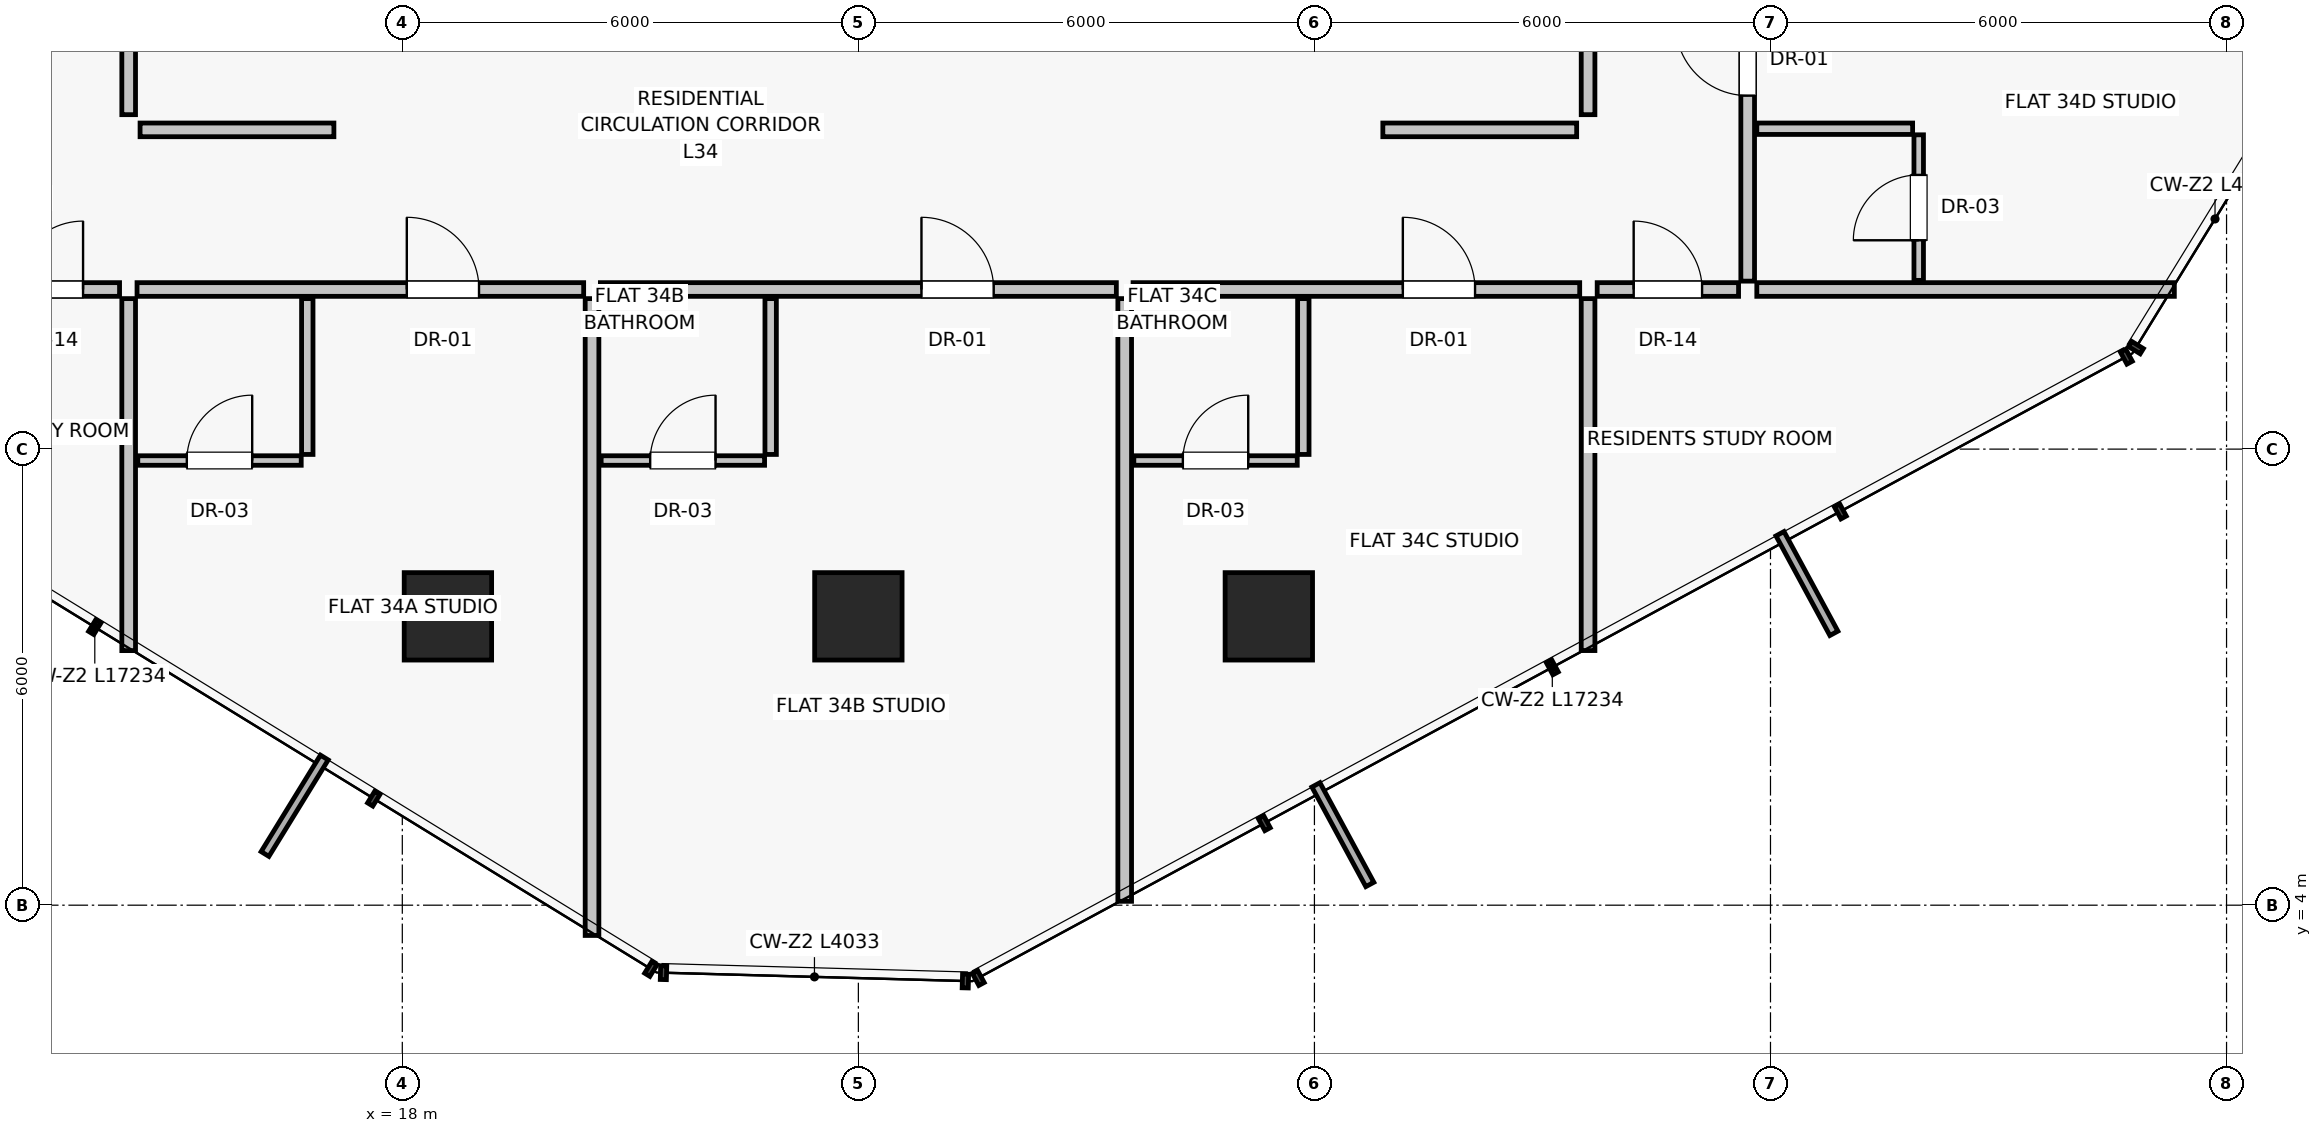
"""IFC4 building model, lengths in metres.
Left out: names, types, materials, properties, quantities, classifications, styles, units other than length and angle.
Written with IfcOpenShell. Run it as: python <this file> out.ifc"""

import sys

from ifc_helpers import new_model, si_unit, direction, frame, frame_2d, origin, origin_2d, place, context, subcontext, project, spatial, rectangle, extrude, source, transform, mapped, element, fill, save


model = new_model("IFC4")
c1 = context("Model", 3, precision=1e-05, world=origin(), true_north=direction((0.0, 1.0)))
c2 = subcontext(c1, "Body", "Model", "MODEL_VIEW")
j1 = project(units=[si_unit("LENGTHUNIT", "METRE"), si_unit("PLANEANGLEUNIT", "RADIAN")], contexts=[c1])
p1 = place(None, origin())
s1 = spatial("IfcSite", under=j1, at=p1, CompositionType="ELEMENT")
p2 = place(p1, origin())
s2 = spatial("IfcBuilding", under=s1, at=p2, CompositionType="ELEMENT")
p3 = place(p2, frame((0.0, 0.0, 123.0)))
s3 = spatial("IfcBuildingStorey", under=s2, at=p3, CompositionType="ELEMENT", Elevation=123.0)
for number, where, z_axis, x_axis in (
    (1, (18.6, 7.8, 0.0), (0.0, 0.0, 1.0), (1.0, 0.0, 0.0)),
    (2, (24.0, 7.8, 0.0), (0.0, 0.0, 1.0), (1.0, 0.0, 0.0)),
    (3, (29.4, 7.8, 0.0), (0.0, 0.0, 1.0), (1.0, 0.0, 0.0)),
):
    element("IfcColumn", number, at=place(p3, frame(where, z_axis=z_axis, x_axis=x_axis)), inside=s3, PredefinedType="COLUMN", context=c2, shape_type="SweptSolid", body=[
        extrude(rectangle(XDim=1.15, YDim=1.15, at=origin_2d()), origin(), (0.0, 0.0, 1.0), 3.25),
    ])
p4 = place(p3, frame((14.4, 14.4, 0.0), z_axis=(0.0, 0.0, 1.0), x_axis=(0.0, 1.0, 0.0)))
e4 = element("IfcWall", 4, at=p4, inside=s3, PredefinedType="PARTITIONING", context=c2, shape_type="SweptSolid", body=[
    extrude(rectangle(XDim=9.4, YDim=0.18, at=frame_2d((4.7, 0.0))), origin(), (0.0, 0.0, 1.0), 3.0),
])
p5 = place(p4, frame((3.8, 0.0, 0.0)))
e5 = element("IfcOpeningElement", 5, at=p5, cuts=e4, PredefinedType="OPENING", context=c2, shape_type="SweptSolid", body=[
    extrude(rectangle(XDim=0.9, YDim=2.01, at=frame_2d((0.45, 1.005))), frame((0.0, 0.1, 0.0), z_axis=(0.0, -1.0, 0.0), x_axis=(1.0, 0.0, 0.0)), (0.0, 0.0, 1.0), 0.2),
])
p6 = place(p3, frame((33.6, 14.4, 0.0), z_axis=(0.0, 0.0, 1.0), x_axis=(0.0, 1.0, 0.0)))
e6 = element("IfcWall", 6, at=p6, inside=s3, PredefinedType="PARTITIONING", context=c2, shape_type="SweptSolid", body=[
    extrude(rectangle(XDim=9.4, YDim=0.18, at=frame_2d((4.7, 0.0))), origin(), (0.0, 0.0, 1.0), 3.0),
])
p7 = place(p6, frame((3.8, 0.0, 0.0)))
e7 = element("IfcOpeningElement", 7, at=p7, cuts=e6, PredefinedType="OPENING", context=c2, shape_type="SweptSolid", body=[
    extrude(rectangle(XDim=0.9, YDim=2.01, at=frame_2d((0.45, 1.005))), frame((0.0, 0.1, 0.0), z_axis=(0.0, -1.0, 0.0), x_axis=(1.0, 0.0, 0.0)), (0.0, 0.0, 1.0), 0.2),
])
for number, where, z_axis, x_axis in (
    (8, (14.55, 14.2, 0.0), (0.0, 0.0, 1.0), (1.0, 0.0, 0.0)),
    (9, (30.9, 14.2, 0.0), (0.0, 0.0, 1.0), (1.0, 0.0, 0.0)),
):
    element("IfcWall", number, at=place(p3, frame(where, z_axis=z_axis, x_axis=x_axis)), inside=s3, PredefinedType="PARTITIONING", context=c2, shape_type="SweptSolid", body=[
        extrude(rectangle(XDim=2.55, YDim=0.18, at=frame_2d((1.275, 0.0))), origin(), (0.0, 0.0, 1.0), 3.0),
    ])
p8 = place(p3, frame((14.4, 11.98, 0.0), z_axis=(0.0, 0.0, 1.0), x_axis=(0.0, -1.0, 0.0)))
e10 = element("IfcWall", 10, at=p8, inside=s3, PredefinedType="PARTITIONING", context=c2, shape_type="SweptSolid", body=[
    extrude(rectangle(XDim=4.631, YDim=0.18, at=frame_2d((2.315, 0.0))), origin(), (0.0, 0.0, 1.0), 3.0),
])
p9 = place(p3, frame((33.6, 11.98, 0.0), z_axis=(0.0, 0.0, 1.0), x_axis=(0.0, -1.0, 0.0)))
e11 = element("IfcWall", 11, at=p9, inside=s3, PredefinedType="PARTITIONING", context=c2, shape_type="SweptSolid", body=[
    extrude(rectangle(XDim=4.63, YDim=0.18, at=frame_2d((2.315, 0.0))), origin(), (0.0, 0.0, 1.0), 3.0),
])
p10 = place(p3, frame((14.51, 12.1, 0.0), z_axis=(0.0, 0.0, 1.0), x_axis=(1.0, 0.0, 0.0)))
e12 = element("IfcWall", 12, at=p10, inside=s3, PredefinedType="PARTITIONING", context=c2, shape_type="SweptSolid", body=[
    extrude(rectangle(XDim=5.876, YDim=0.18, at=frame_2d((2.938, 0.0))), origin(), (0.0, 0.0, 1.0), 2.58),
])
p11 = place(p10, frame((3.549, 0.0, 0.0)))
e13 = element("IfcOpeningElement", 13, at=p11, cuts=e12, PredefinedType="OPENING", context=c2, shape_type="SweptSolid", body=[
    extrude(rectangle(XDim=0.95, YDim=2.02, at=frame_2d((0.475, 1.01))), frame((0.0, 0.1, 0.0), z_axis=(0.0, -1.0, 0.0), x_axis=(1.0, 0.0, 0.0)), (0.0, 0.0, 1.0), 0.2),
])
p12 = place(p3, frame((16.75, 11.98, 0.0), z_axis=(0.0, 0.0, 1.0), x_axis=(0.0, -1.0, 0.0)))
e14 = element("IfcWall", 14, at=p12, inside=s3, PredefinedType="PARTITIONING", context=c2, shape_type="SweptSolid", body=[
    extrude(rectangle(XDim=2.05, YDim=0.15, at=frame_2d((1.025, 0.0))), origin(), (0.0, 0.0, 1.0), 3.0),
])
p13 = place(p3, frame((14.52, 9.85, 0.0), z_axis=(0.0, 0.0, 1.0), x_axis=(1.0, 0.0, 0.0)))
e15 = element("IfcWall", 15, at=p13, inside=s3, PredefinedType="PARTITIONING", context=c2, shape_type="SweptSolid", body=[
    extrude(rectangle(XDim=2.15, YDim=0.125, at=frame_2d((1.075, 0.0))), origin(), (0.0, 0.0, 1.0), 3.0),
])
p14 = place(p13, frame((0.645, 0.0, 0.0)))
e16 = element("IfcOpeningElement", 16, at=p14, cuts=e15, PredefinedType="OPENING", context=c2, shape_type="SweptSolid", body=[
    extrude(rectangle(XDim=0.86, YDim=2.01, at=frame_2d((0.43, 1.005))), frame((0.0, 0.073, 0.0), z_axis=(0.0, -1.0, 0.0), x_axis=(1.0, 0.0, 0.0)), (0.0, 0.0, 1.0), 0.145),
])
p15 = place(p3, frame((20.496, 11.98, 0.0), z_axis=(0.0, 0.0, 1.0), x_axis=(0.0, -1.0, 0.0)))
e17 = element("IfcWall", 17, at=p15, inside=s3, PredefinedType="PARTITIONING", context=c2, shape_type="SweptSolid", body=[
    extrude(rectangle(XDim=8.378, YDim=0.18, at=frame_2d((4.189, 0.0))), origin(), (0.0, 0.0, 1.0), 3.0),
])
p16 = place(p3, frame((20.606, 12.1, 0.0), z_axis=(0.0, 0.0, 1.0), x_axis=(1.0, 0.0, 0.0)))
e18 = element("IfcWall", 18, at=p16, inside=s3, PredefinedType="PARTITIONING", context=c2, shape_type="SweptSolid", body=[
    extrude(rectangle(XDim=6.788, YDim=0.18, at=frame_2d((3.394, 0.0))), origin(), (0.0, 0.0, 1.0), 2.58),
])
p17 = place(p16, frame((4.224, 0.0, 0.0)))
e19 = element("IfcOpeningElement", 19, at=p17, cuts=e18, PredefinedType="OPENING", context=c2, shape_type="SweptSolid", body=[
    extrude(rectangle(XDim=0.95, YDim=2.02, at=frame_2d((0.475, 1.01))), frame((0.0, 0.1, 0.0), z_axis=(0.0, -1.0, 0.0), x_axis=(1.0, 0.0, 0.0)), (0.0, 0.0, 1.0), 0.2),
])
p18 = place(p3, frame((22.846, 11.98, 0.0), z_axis=(0.0, 0.0, 1.0), x_axis=(0.0, -1.0, 0.0)))
e20 = element("IfcWall", 20, at=p18, inside=s3, PredefinedType="PARTITIONING", context=c2, shape_type="SweptSolid", body=[
    extrude(rectangle(XDim=2.05, YDim=0.15, at=frame_2d((1.025, 0.0))), origin(), (0.0, 0.0, 1.0), 3.0),
])
p19 = place(p3, frame((20.616, 9.85, 0.0), z_axis=(0.0, 0.0, 1.0), x_axis=(1.0, 0.0, 0.0)))
e21 = element("IfcWall", 21, at=p19, inside=s3, PredefinedType="PARTITIONING", context=c2, shape_type="SweptSolid", body=[
    extrude(rectangle(XDim=2.15, YDim=0.125, at=frame_2d((1.075, 0.0))), origin(), (0.0, 0.0, 1.0), 3.0),
])
p20 = place(p19, frame((0.645, 0.0, 0.0)))
e22 = element("IfcOpeningElement", 22, at=p20, cuts=e21, PredefinedType="OPENING", context=c2, shape_type="SweptSolid", body=[
    extrude(rectangle(XDim=0.86, YDim=2.01, at=frame_2d((0.43, 1.005))), frame((0.0, 0.073, 0.0), z_axis=(0.0, -1.0, 0.0), x_axis=(1.0, 0.0, 0.0)), (0.0, 0.0, 1.0), 0.145),
])
p21 = place(p3, frame((27.504, 11.98, 0.0), z_axis=(0.0, 0.0, 1.0), x_axis=(0.0, -1.0, 0.0)))
e23 = element("IfcWall", 23, at=p21, inside=s3, PredefinedType="PARTITIONING", context=c2, shape_type="SweptSolid", body=[
    extrude(rectangle(XDim=7.929, YDim=0.18, at=frame_2d((3.964, 0.0))), origin(), (0.0, 0.0, 1.0), 3.0),
])
p22 = place(p3, frame((27.614, 12.1, 0.0), z_axis=(0.0, 0.0, 1.0), x_axis=(1.0, 0.0, 0.0)))
e24 = element("IfcWall", 24, at=p22, inside=s3, PredefinedType="PARTITIONING", context=c2, shape_type="SweptSolid", body=[
    extrude(rectangle(XDim=5.876, YDim=0.18, at=frame_2d((2.938, 0.0))), origin(), (0.0, 0.0, 1.0), 2.58),
])
p23 = place(p22, frame((3.549, 0.0, 0.0)))
e25 = element("IfcOpeningElement", 25, at=p23, cuts=e24, PredefinedType="OPENING", context=c2, shape_type="SweptSolid", body=[
    extrude(rectangle(XDim=0.95, YDim=2.02, at=frame_2d((0.475, 1.01))), frame((0.0, 0.1, 0.0), z_axis=(0.0, -1.0, 0.0), x_axis=(1.0, 0.0, 0.0)), (0.0, 0.0, 1.0), 0.2),
])
p24 = place(p3, frame((29.854, 11.98, 0.0), z_axis=(0.0, 0.0, 1.0), x_axis=(0.0, -1.0, 0.0)))
e26 = element("IfcWall", 26, at=p24, inside=s3, PredefinedType="PARTITIONING", context=c2, shape_type="SweptSolid", body=[
    extrude(rectangle(XDim=2.05, YDim=0.15, at=frame_2d((1.025, 0.0))), origin(), (0.0, 0.0, 1.0), 2.378),
])
p25 = place(p3, frame((27.624, 9.85, 0.0), z_axis=(0.0, 0.0, 1.0), x_axis=(1.0, 0.0, 0.0)))
e27 = element("IfcWall", 27, at=p25, inside=s3, PredefinedType="PARTITIONING", context=c2, shape_type="SweptSolid", body=[
    extrude(rectangle(XDim=2.15, YDim=0.125, at=frame_2d((1.075, 0.0))), origin(), (0.0, 0.0, 1.0), 3.0),
])
p26 = place(p25, frame((0.645, 0.0, 0.0)))
e28 = element("IfcOpeningElement", 28, at=p26, cuts=e27, PredefinedType="OPENING", context=c2, shape_type="SweptSolid", body=[
    extrude(rectangle(XDim=0.86, YDim=2.01, at=frame_2d((0.43, 1.005))), frame((0.0, 0.073, 0.0), z_axis=(0.0, -1.0, 0.0), x_axis=(1.0, 0.0, 0.0)), (0.0, 0.0, 1.0), 0.145),
])
p27 = place(p3, frame((35.82, 12.1, 0.0), z_axis=(0.0, 0.0, 1.0), x_axis=(1.0, 0.0, 0.0)))
e29 = element("IfcWall", 29, at=p27, inside=s3, PredefinedType="PARTITIONING", context=c2, shape_type="SweptSolid", body=[
    extrude(rectangle(XDim=5.493, YDim=0.18, at=frame_2d((2.747, 0.0))), origin(), (0.0, 0.0, 1.0), 3.0),
])
p28 = place(p3, frame((35.7, 12.21, 0.0), z_axis=(0.0, 0.0, 1.0), x_axis=(0.0, 1.0, 0.0)))
e30 = element("IfcWall", 30, at=p28, inside=s3, PredefinedType="PARTITIONING", context=c2, shape_type="SweptSolid", body=[
    extrude(rectangle(XDim=4.378, YDim=0.18, at=frame_2d((2.189, 0.0))), origin(), (0.0, 0.0, 1.0), 3.0),
])
p29 = place(p28, frame((2.441, 0.0, 0.0)))
e31 = element("IfcOpeningElement", 31, at=p29, cuts=e30, PredefinedType="OPENING", context=c2, shape_type="SweptSolid", body=[
    extrude(rectangle(XDim=0.95, YDim=2.02, at=frame_2d((0.475, 1.01))), frame((0.0, 0.1, 0.0), z_axis=(0.0, -1.0, 0.0), x_axis=(1.0, 0.0, 0.0)), (0.0, 0.0, 1.0), 0.2),
])
p30 = place(p3, frame((35.82, 14.215, 0.0), z_axis=(0.0, 0.0, 1.0), x_axis=(1.0, 0.0, 0.0)))
e32 = element("IfcWall", 32, at=p30, inside=s3, PredefinedType="PARTITIONING", context=c2, shape_type="SweptSolid", body=[
    extrude(rectangle(XDim=2.05, YDim=0.15, at=frame_2d((1.025, 0.0))), origin(), (0.0, 0.0, 1.0), 3.0),
])
p31 = place(p3, frame((37.95, 12.22, 0.0), z_axis=(0.0, 0.0, 1.0), x_axis=(0.0, 1.0, 0.0)))
e33 = element("IfcWall", 33, at=p31, inside=s3, PredefinedType="PARTITIONING", context=c2, shape_type="SweptSolid", body=[
    extrude(rectangle(XDim=1.915, YDim=0.125, at=frame_2d((0.958, 0.0))), origin(), (0.0, 0.0, 1.0), 3.0),
])
p32 = place(p31, frame((0.528, 0.0, 0.0)))
e34 = element("IfcOpeningElement", 34, at=p32, cuts=e33, PredefinedType="OPENING", context=c2, shape_type="SweptSolid", body=[
    extrude(rectangle(XDim=0.86, YDim=2.01, at=frame_2d((0.43, 1.005))), frame((0.0, 0.073, 0.0), z_axis=(0.0, -1.0, 0.0), x_axis=(1.0, 0.0, 0.0)), (0.0, 0.0, 1.0), 0.145),
])
p33 = place(p3, frame((12.42, 12.1, 0.0), z_axis=(0.0, 0.0, 1.0), x_axis=(1.0, 0.0, 0.0)))
e35 = element("IfcWall", 35, at=p33, inside=s3, PredefinedType="PARTITIONING", context=c2, shape_type="SweptSolid", body=[
    extrude(rectangle(XDim=1.86, YDim=0.18, at=frame_2d((0.93, 0.0))), origin(), (0.0, 0.0, 1.0), 3.0),
])
p34 = place(p33, frame((0.48, 0.0, 0.0)))
e36 = element("IfcOpeningElement", 36, at=p34, cuts=e35, PredefinedType="OPENING", context=c2, shape_type="SweptSolid", body=[
    extrude(rectangle(XDim=0.9, YDim=2.01, at=frame_2d((0.45, 1.005))), frame((0.0, 0.1, 0.0), z_axis=(0.0, -1.0, 0.0), x_axis=(1.0, 0.0, 0.0)), (0.0, 0.0, 1.0), 0.2),
])
p35 = place(p3, frame((33.72, 12.1, 0.0), z_axis=(0.0, 0.0, 1.0), x_axis=(1.0, 0.0, 0.0)))
e37 = element("IfcWall", 37, at=p35, inside=s3, PredefinedType="PARTITIONING", context=c2, shape_type="SweptSolid", body=[
    extrude(rectangle(XDim=1.86, YDim=0.18, at=frame_2d((0.93, 0.0))), origin(), (0.0, 0.0, 1.0), 3.0),
])
p36 = place(p35, frame((0.48, 0.0, 0.0)))
e38 = element("IfcOpeningElement", 38, at=p36, cuts=e37, PredefinedType="OPENING", context=c2, shape_type="SweptSolid", body=[
    extrude(rectangle(XDim=0.9, YDim=2.01, at=frame_2d((0.45, 1.005))), frame((0.0, 0.1, 0.0), z_axis=(0.0, -1.0, 0.0), x_axis=(1.0, 0.0, 0.0)), (0.0, 0.0, 1.0), 0.2),
])
m1 = source(origin(), c2, "Body", "SweptSolid", [
    extrude(rectangle(XDim=0.95, YDim=2.02, at=frame_2d((0.475, 1.01))), frame((0.0, 0.025, 0.0), z_axis=(0.0, -1.0, 0.0), x_axis=(1.0, 0.0, 0.0)), (0.0, 0.0, 1.0), 0.05),
])
p37 = place(p11, origin())
e39 = element("IfcDoor", 39, at=p37, inside=s3, OperationType="SINGLE_SWING_LEFT", PredefinedType="DOOR", context=c2, shape_type="MappedRepresentation", body=[
    mapped(m1, transform((0.0, 0.0, 0.0), scale=1.0)),
])
fill(e13, e39)
m2 = source(origin(), c2, "Body", "SweptSolid", [
    extrude(rectangle(XDim=0.86, YDim=2.01, at=frame_2d((0.43, 1.005))), frame((0.0, 0.025, 0.0), z_axis=(0.0, -1.0, 0.0), x_axis=(1.0, 0.0, 0.0)), (0.0, 0.0, 1.0), 0.05),
])
p38 = place(p14, origin())
e40 = element("IfcDoor", 40, at=p38, inside=s3, OperationType="SINGLE_SWING_RIGHT", PredefinedType="DOOR", context=c2, shape_type="MappedRepresentation", body=[
    mapped(m2, transform((0.0, 0.0, 0.0), scale=1.0)),
])
fill(e16, e40)
p39 = place(p17, origin())
e41 = element("IfcDoor", 41, at=p39, inside=s3, OperationType="SINGLE_SWING_LEFT", PredefinedType="DOOR", context=c2, shape_type="MappedRepresentation", body=[
    mapped(m1, transform((0.0, 0.0, 0.0), scale=1.0)),
])
fill(e19, e41)
p40 = place(p20, origin())
e42 = element("IfcDoor", 42, at=p40, inside=s3, OperationType="SINGLE_SWING_RIGHT", PredefinedType="DOOR", context=c2, shape_type="MappedRepresentation", body=[
    mapped(m2, transform((0.0, 0.0, 0.0), scale=1.0)),
])
fill(e22, e42)
p41 = place(p23, origin())
e43 = element("IfcDoor", 43, at=p41, inside=s3, OperationType="SINGLE_SWING_LEFT", PredefinedType="DOOR", context=c2, shape_type="MappedRepresentation", body=[
    mapped(m1, transform((0.0, 0.0, 0.0), scale=1.0)),
])
fill(e25, e43)
p42 = place(p26, origin())
e44 = element("IfcDoor", 44, at=p42, inside=s3, OperationType="SINGLE_SWING_RIGHT", PredefinedType="DOOR", context=c2, shape_type="MappedRepresentation", body=[
    mapped(m2, transform((0.0, 0.0, 0.0), scale=1.0)),
])
fill(e28, e44)
p43 = place(p29, origin())
e45 = element("IfcDoor", 45, at=p43, inside=s3, OperationType="SINGLE_SWING_RIGHT", PredefinedType="DOOR", context=c2, shape_type="MappedRepresentation", body=[
    mapped(m1, transform((0.0, 0.0, 0.0), scale=1.0)),
])
fill(e31, e45)
p44 = place(p32, origin())
e46 = element("IfcDoor", 46, at=p44, inside=s3, OperationType="SINGLE_SWING_LEFT", PredefinedType="DOOR", context=c2, shape_type="MappedRepresentation", body=[
    mapped(m2, transform((0.0, 0.0, 0.0), scale=1.0)),
])
fill(e34, e46)
m3 = source(origin(), c2, "Body", "SweptSolid", [
    extrude(rectangle(XDim=0.9, YDim=2.01, at=frame_2d((0.45, 1.005))), frame((0.0, 0.025, 0.0), z_axis=(0.0, -1.0, 0.0), x_axis=(1.0, 0.0, 0.0)), (0.0, 0.0, 1.0), 0.05),
])
p45 = place(p34, origin())
e47 = element("IfcDoor", 47, at=p45, inside=s3, OperationType="SINGLE_SWING_RIGHT", PredefinedType="DOOR", context=c2, shape_type="MappedRepresentation", body=[
    mapped(m3, transform((0.0, 0.0, 0.0), scale=1.0)),
])
fill(e36, e47)
p46 = place(p36, origin())
e48 = element("IfcDoor", 48, at=p46, inside=s3, OperationType="SINGLE_SWING_LEFT", PredefinedType="DOOR", context=c2, shape_type="MappedRepresentation", body=[
    mapped(m3, transform((0.0, 0.0, 0.0), scale=1.0)),
])
fill(e38, e48)
save(model, sys.argv[1])
